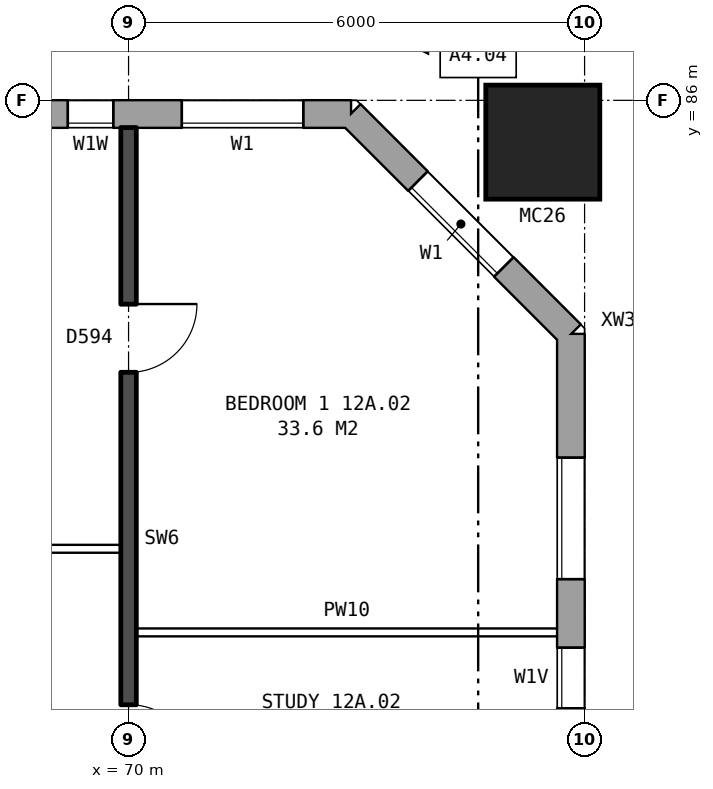
"""IFC4 building model, lengths in metres.
Left out: names, types, materials, properties, quantities, classifications, styles, units other than length and angle.
Written with IfcOpenShell. Run it as: python <this file> out.ifc"""

import sys

from ifc_helpers import new_model, si_unit, direction, frame, frame_2d, origin, origin_2d, place, context, subcontext, project, spatial, rectangle, hollow_rectangle, extrude, element, fill, save


model = new_model("IFC4")
c1 = context("Model", 3, precision=1e-05, world=origin(), true_north=direction((0.0, 1.0)))
c2 = subcontext(c1, "Body", "Model", "MODEL_VIEW")
j1 = project(units=[si_unit("LENGTHUNIT", "METRE"), si_unit("PLANEANGLEUNIT", "RADIAN")], contexts=[c1])
p1 = place(None, origin())
s1 = spatial("IfcSite", under=j1, at=p1, CompositionType="ELEMENT")
p2 = place(p1, origin())
s2 = spatial("IfcBuilding", under=s1, at=p2, CompositionType="ELEMENT")
p3 = place(p2, frame((0.0, 0.0, 47.4)))
s3 = spatial("IfcBuildingStorey", under=s2, at=p3, CompositionType="ELEMENT", Elevation=47.4)
p4 = place(p3, frame((75.45, 85.45, 0.0), z_axis=(0.0, 0.0, 1.0), x_axis=(1.0, 0.0, 0.0)))
e1 = element("IfcColumn", 1, at=p4, inside=s3, PredefinedType="COLUMN", context=c2, shape_type="SweptSolid", body=[
    extrude(hollow_rectangle(XDim=1.5, YDim=1.5, WallThickness=0.08, at=origin_2d()), origin(), (0.0, 0.0, 1.0), 3.1),
])
p5 = place(p3, frame((75.82, 57.075, 0.0), z_axis=(0.0, 0.0, 1.0), x_axis=(0.0, 1.0, 0.0)))
e2 = element("IfcWall", 2, at=p5, inside=s3, PredefinedType="STANDARD", context=c2, shape_type="SweptSolid", body=[
    extrude(rectangle(XDim=25.851, YDim=0.36, at=frame_2d((12.925, 0.0))), origin(), (0.0, 0.0, 1.0), 2.85),
])
p6 = place(p5, frame((1.625, 0.0, 0.8)))
e3 = element("IfcOpeningElement", 3, at=p6, cuts=e2, PredefinedType="OPENING", context=c2, shape_type="SweptSolid", body=[
    extrude(rectangle(XDim=1.6, YDim=1.8, at=frame_2d((0.8, 0.9))), frame((0.0, 0.19, 0.0), z_axis=(0.0, -1.0, 0.0), x_axis=(1.0, 0.0, 0.0)), (0.0, 0.0, 1.0), 0.38),
])
p7 = place(p5, frame((3.525, 0.0, 1.7)))
e4 = element("IfcOpeningElement", 4, at=p7, cuts=e2, PredefinedType="OPENING", context=c2, shape_type="SweptSolid", body=[
    extrude(rectangle(XDim=1.4, YDim=0.9, at=frame_2d((0.7, 0.45))), frame((0.0, 0.19, 0.0), z_axis=(0.0, -1.0, 0.0), x_axis=(1.0, 0.0, 0.0)), (0.0, 0.0, 1.0), 0.38),
])
p8 = place(p5, frame((19.225, 0.0, 0.45)))
e5 = element("IfcOpeningElement", 5, at=p8, cuts=e2, PredefinedType="OPENING", context=c2, shape_type="SweptSolid", body=[
    extrude(rectangle(XDim=1.0, YDim=0.9, at=frame_2d((0.5, 0.45))), frame((0.0, 0.19, 0.0), z_axis=(0.0, -1.0, 0.0), x_axis=(1.0, 0.0, 0.0)), (0.0, 0.0, 1.0), 0.38),
])
p9 = place(p5, frame((22.625, 0.0, 0.8)))
e6 = element("IfcOpeningElement", 6, at=p9, cuts=e2, PredefinedType="OPENING", context=c2, shape_type="SweptSolid", body=[
    extrude(rectangle(XDim=1.6, YDim=1.8, at=frame_2d((0.8, 0.9))), frame((0.0, 0.19, 0.0), z_axis=(0.0, -1.0, 0.0), x_axis=(1.0, 0.0, 0.0)), (0.0, 0.0, 1.0), 0.38),
])
p10 = place(p5, frame((20.925, 0.0, 1.65)))
e7 = element("IfcOpeningElement", 7, at=p10, cuts=e2, PredefinedType="OPENING", context=c2, shape_type="SweptSolid", body=[
    extrude(rectangle(XDim=0.8, YDim=0.9, at=frame_2d((0.4, 0.45))), frame((0.0, 0.19, 0.0), z_axis=(0.0, -1.0, 0.0), x_axis=(1.0, 0.0, 0.0)), (0.0, 0.0, 1.0), 0.38),
])
p11 = place(p3, frame((75.82, 82.925, 0.0), z_axis=(0.0, 0.0, 1.0), x_axis=(-0.707106781187, 0.707106781187, 0.0)))
e8 = element("IfcWall", 8, at=p11, inside=s3, PredefinedType="STANDARD", context=c2, shape_type="SweptSolid", body=[
    extrude(rectangle(XDim=4.094, YDim=0.36, at=frame_2d((2.047, 0.0))), origin(), (0.0, 0.0, 1.0), 2.85),
])
p12 = place(p11, frame((1.247, 0.0, 0.8)))
e9 = element("IfcOpeningElement", 9, at=p12, cuts=e8, PredefinedType="OPENING", context=c2, shape_type="SweptSolid", body=[
    extrude(rectangle(XDim=1.6, YDim=1.8, at=frame_2d((0.8, 0.9))), frame((0.0, 0.19, 0.0), z_axis=(0.0, -1.0, 0.0), x_axis=(1.0, 0.0, 0.0)), (0.0, 0.0, 1.0), 0.38),
])
p13 = place(p3, frame((72.925, 85.82, 0.0), z_axis=(0.0, 0.0, 1.0), x_axis=(-1.0, 0.0, 0.0)))
e10 = element("IfcWall", 10, at=p13, inside=s3, PredefinedType="STANDARD", context=c2, shape_type="SweptSolid", body=[
    extrude(rectangle(XDim=48.351, YDim=0.36, at=frame_2d((24.175, 0.0))), origin(), (0.0, 0.0, 1.0), 2.85),
])
p14 = place(p13, frame((0.625, 0.0, 0.8)))
e11 = element("IfcOpeningElement", 11, at=p14, cuts=e10, PredefinedType="OPENING", context=c2, shape_type="SweptSolid", body=[
    extrude(rectangle(XDim=1.6, YDim=1.8, at=frame_2d((0.8, 0.9))), frame((0.0, 0.19, 0.0), z_axis=(0.0, -1.0, 0.0), x_axis=(1.0, 0.0, 0.0)), (0.0, 0.0, 1.0), 0.38),
])
p15 = place(p13, frame((3.125, 0.0, 1.7)))
e12 = element("IfcOpeningElement", 12, at=p15, cuts=e10, PredefinedType="OPENING", context=c2, shape_type="SweptSolid", body=[
    extrude(rectangle(XDim=0.6, YDim=0.9, at=frame_2d((0.3, 0.45))), frame((0.0, 0.19, 0.0), z_axis=(0.0, -1.0, 0.0), x_axis=(1.0, 0.0, 0.0)), (0.0, 0.0, 1.0), 0.38),
])
p16 = place(p13, frame((6.625, 0.0, 0.8)))
e13 = element("IfcOpeningElement", 13, at=p16, cuts=e10, PredefinedType="OPENING", context=c2, shape_type="SweptSolid", body=[
    extrude(rectangle(XDim=1.6, YDim=1.8, at=frame_2d((0.8, 0.9))), frame((0.0, 0.19, 0.0), z_axis=(0.0, -1.0, 0.0), x_axis=(1.0, 0.0, 0.0)), (0.0, 0.0, 1.0), 0.38),
])
p17 = place(p13, frame((9.625, 0.0, 0.8)))
e14 = element("IfcOpeningElement", 14, at=p17, cuts=e10, PredefinedType="OPENING", context=c2, shape_type="SweptSolid", body=[
    extrude(rectangle(XDim=1.6, YDim=1.8, at=frame_2d((0.8, 0.9))), frame((0.0, 0.19, 0.0), z_axis=(0.0, -1.0, 0.0), x_axis=(1.0, 0.0, 0.0)), (0.0, 0.0, 1.0), 0.38),
])
p18 = place(p13, frame((12.625, 0.0, 0.8)))
e15 = element("IfcOpeningElement", 15, at=p18, cuts=e10, PredefinedType="OPENING", context=c2, shape_type="SweptSolid", body=[
    extrude(rectangle(XDim=1.6, YDim=1.8, at=frame_2d((0.8, 0.9))), frame((0.0, 0.19, 0.0), z_axis=(0.0, -1.0, 0.0), x_axis=(1.0, 0.0, 0.0)), (0.0, 0.0, 1.0), 0.38),
])
p19 = place(p13, frame((15.625, 0.0, 0.8)))
e16 = element("IfcOpeningElement", 16, at=p19, cuts=e10, PredefinedType="OPENING", context=c2, shape_type="SweptSolid", body=[
    extrude(rectangle(XDim=1.6, YDim=1.8, at=frame_2d((0.8, 0.9))), frame((0.0, 0.19, 0.0), z_axis=(0.0, -1.0, 0.0), x_axis=(1.0, 0.0, 0.0)), (0.0, 0.0, 1.0), 0.38),
])
p20 = place(p13, frame((18.625, 0.0, 0.8)))
e17 = element("IfcOpeningElement", 17, at=p20, cuts=e10, PredefinedType="OPENING", context=c2, shape_type="SweptSolid", body=[
    extrude(rectangle(XDim=1.6, YDim=1.8, at=frame_2d((0.8, 0.9))), frame((0.0, 0.19, 0.0), z_axis=(0.0, -1.0, 0.0), x_axis=(1.0, 0.0, 0.0)), (0.0, 0.0, 1.0), 0.38),
])
p21 = place(p13, frame((21.625, 0.0, 0.8)))
e18 = element("IfcOpeningElement", 18, at=p21, cuts=e10, PredefinedType="OPENING", context=c2, shape_type="SweptSolid", body=[
    extrude(rectangle(XDim=1.6, YDim=1.8, at=frame_2d((0.8, 0.9))), frame((0.0, 0.19, 0.0), z_axis=(0.0, -1.0, 0.0), x_axis=(1.0, 0.0, 0.0)), (0.0, 0.0, 1.0), 0.38),
])
p22 = place(p13, frame((24.625, 0.0, 0.8)))
e19 = element("IfcOpeningElement", 19, at=p22, cuts=e10, PredefinedType="OPENING", context=c2, shape_type="SweptSolid", body=[
    extrude(rectangle(XDim=1.6, YDim=1.8, at=frame_2d((0.8, 0.9))), frame((0.0, 0.19, 0.0), z_axis=(0.0, -1.0, 0.0), x_axis=(1.0, 0.0, 0.0)), (0.0, 0.0, 1.0), 0.38),
])
p23 = place(p13, frame((27.625, 0.0, 0.8)))
e20 = element("IfcOpeningElement", 20, at=p23, cuts=e10, PredefinedType="OPENING", context=c2, shape_type="SweptSolid", body=[
    extrude(rectangle(XDim=1.6, YDim=1.8, at=frame_2d((0.8, 0.9))), frame((0.0, 0.19, 0.0), z_axis=(0.0, -1.0, 0.0), x_axis=(1.0, 0.0, 0.0)), (0.0, 0.0, 1.0), 0.38),
])
p24 = place(p13, frame((30.625, 0.0, 0.8)))
e21 = element("IfcOpeningElement", 21, at=p24, cuts=e10, PredefinedType="OPENING", context=c2, shape_type="SweptSolid", body=[
    extrude(rectangle(XDim=1.6, YDim=1.8, at=frame_2d((0.8, 0.9))), frame((0.0, 0.19, 0.0), z_axis=(0.0, -1.0, 0.0), x_axis=(1.0, 0.0, 0.0)), (0.0, 0.0, 1.0), 0.38),
])
p25 = place(p13, frame((33.625, 0.0, 0.8)))
e22 = element("IfcOpeningElement", 22, at=p25, cuts=e10, PredefinedType="OPENING", context=c2, shape_type="SweptSolid", body=[
    extrude(rectangle(XDim=1.6, YDim=1.8, at=frame_2d((0.8, 0.9))), frame((0.0, 0.19, 0.0), z_axis=(0.0, -1.0, 0.0), x_axis=(1.0, 0.0, 0.0)), (0.0, 0.0, 1.0), 0.38),
])
p26 = place(p13, frame((36.625, 0.0, 0.8)))
e23 = element("IfcOpeningElement", 23, at=p26, cuts=e10, PredefinedType="OPENING", context=c2, shape_type="SweptSolid", body=[
    extrude(rectangle(XDim=1.6, YDim=1.8, at=frame_2d((0.8, 0.9))), frame((0.0, 0.19, 0.0), z_axis=(0.0, -1.0, 0.0), x_axis=(1.0, 0.0, 0.0)), (0.0, 0.0, 1.0), 0.38),
])
p27 = place(p13, frame((39.625, 0.0, 0.8)))
e24 = element("IfcOpeningElement", 24, at=p27, cuts=e10, PredefinedType="OPENING", context=c2, shape_type="SweptSolid", body=[
    extrude(rectangle(XDim=1.6, YDim=1.8, at=frame_2d((0.8, 0.9))), frame((0.0, 0.19, 0.0), z_axis=(0.0, -1.0, 0.0), x_axis=(1.0, 0.0, 0.0)), (0.0, 0.0, 1.0), 0.38),
])
p28 = place(p13, frame((41.525, 0.0, 0.8)))
e25 = element("IfcOpeningElement", 25, at=p28, cuts=e10, PredefinedType="OPENING", context=c2, shape_type="SweptSolid", body=[
    extrude(rectangle(XDim=1.2, YDim=1.2, at=frame_2d((0.6, 0.6))), frame((0.0, 0.19, 0.0), z_axis=(0.0, -1.0, 0.0), x_axis=(1.0, 0.0, 0.0)), (0.0, 0.0, 1.0), 0.38),
])
p29 = place(p13, frame((45.625, 0.0, 0.8)))
e26 = element("IfcOpeningElement", 26, at=p29, cuts=e10, PredefinedType="OPENING", context=c2, shape_type="SweptSolid", body=[
    extrude(rectangle(XDim=1.6, YDim=1.8, at=frame_2d((0.8, 0.9))), frame((0.0, 0.19, 0.0), z_axis=(0.0, -1.0, 0.0), x_axis=(1.0, 0.0, 0.0)), (0.0, 0.0, 1.0), 0.38),
])
p30 = place(p13, frame((5.225, 0.0, 0.8)))
e27 = element("IfcOpeningElement", 27, at=p30, cuts=e10, PredefinedType="OPENING", context=c2, shape_type="SweptSolid", body=[
    extrude(rectangle(XDim=1.0, YDim=0.9, at=frame_2d((0.5, 0.45))), frame((0.0, 0.19, 0.0), z_axis=(0.0, -1.0, 0.0), x_axis=(1.0, 0.0, 0.0)), (0.0, 0.0, 1.0), 0.38),
])
p31 = place(p3, frame((70.1, 79.0, 0.0), z_axis=(0.0, 0.0, 1.0), x_axis=(1.0, 0.0, 0.0)))
e28 = element("IfcWall", 28, at=p31, inside=s3, PredefinedType="PARTITIONING", context=c2, shape_type="SweptSolid", body=[
    extrude(rectangle(XDim=5.54, YDim=0.1, at=frame_2d((2.77, 0.0))), origin(), (0.0, 0.0, 1.0), 2.85),
])
p32 = place(p3, frame((64.1, 80.1, 0.0), z_axis=(0.0, 0.0, 1.0), x_axis=(1.0, 0.0, 0.0)))
e29 = element("IfcWall", 29, at=p32, inside=s3, PredefinedType="PARTITIONING", context=c2, shape_type="SweptSolid", body=[
    extrude(rectangle(XDim=5.8, YDim=0.1, at=frame_2d((2.9, 0.0))), origin(), (0.0, 0.0, 1.0), 2.85),
])
p33 = place(p32, frame((3.6, 0.0, 0.0)))
e30 = element("IfcOpeningElement", 30, at=p33, cuts=e29, PredefinedType="OPENING", context=c2, shape_type="SweptSolid", body=[
    extrude(rectangle(XDim=0.9, YDim=2.1, at=frame_2d((0.45, 1.05))), frame((0.0, 0.06, 0.0), z_axis=(0.0, -1.0, 0.0), x_axis=(1.0, 0.0, 0.0)), (0.0, 0.0, 1.0), 0.12),
])
p34 = place(p32, frame((0.7, 0.0, 0.0)))
e31 = element("IfcOpeningElement", 31, at=p34, cuts=e29, PredefinedType="OPENING", context=c2, shape_type="SweptSolid", body=[
    extrude(rectangle(XDim=0.9, YDim=2.1, at=frame_2d((0.45, 1.05))), frame((0.0, 0.06, 0.0), z_axis=(0.0, -1.0, 0.0), x_axis=(1.0, 0.0, 0.0)), (0.0, 0.0, 1.0), 0.12),
])
p35 = place(p3, frame((70.0, 76.2, 0.0), z_axis=(0.0, 0.0, 1.0), x_axis=(0.0, 1.0, 0.0)))
e32 = element("IfcWall", 32, at=p35, inside=s3, PredefinedType="SOLIDWALL", context=c2, shape_type="SweptSolid", body=[
    extrude(rectangle(XDim=9.44, YDim=0.2, at=frame_2d((4.72, 0.0))), origin(), (0.0, 0.0, 1.0), 2.85),
])
p36 = place(p35, frame((6.22, 0.0, 0.0)))
e33 = element("IfcOpeningElement", 33, at=p36, cuts=e32, PredefinedType="OPENING", context=c2, shape_type="SweptSolid", body=[
    extrude(rectangle(XDim=0.9, YDim=2.1, at=frame_2d((0.45, 1.05))), frame((0.0, 0.11, 0.0), z_axis=(0.0, -1.0, 0.0), x_axis=(1.0, 0.0, 0.0)), (0.0, 0.0, 1.0), 0.22),
])
p37 = place(p35, frame((0.95, 0.0, 0.0)))
e34 = element("IfcOpeningElement", 34, at=p37, cuts=e32, PredefinedType="OPENING", context=c2, shape_type="SweptSolid", body=[
    extrude(rectangle(XDim=0.9, YDim=2.1, at=frame_2d((0.45, 1.05))), frame((0.0, 0.11, 0.0), z_axis=(0.0, -1.0, 0.0), x_axis=(1.0, 0.0, 0.0)), (0.0, 0.0, 1.0), 0.22),
])
p38 = place(p9, origin())
e35 = element("IfcWindow", 35, at=p38, inside=s3, PartitioningType="SINGLE_PANEL", PredefinedType="WINDOW", context=c2, shape_type="SweptSolid", body=[
    extrude(rectangle(XDim=1.6, YDim=1.8, at=frame_2d((0.8, 0.9))), frame((0.0, 0.15, 0.0), z_axis=(0.0, -1.0, 0.0), x_axis=(1.0, 0.0, 0.0)), (0.0, 0.0, 1.0), 0.06),
])
fill(e6, e35)
p39 = place(p12, origin())
e36 = element("IfcWindow", 36, at=p39, inside=s3, PartitioningType="SINGLE_PANEL", PredefinedType="WINDOW", context=c2, shape_type="SweptSolid", body=[
    extrude(rectangle(XDim=1.6, YDim=1.8, at=frame_2d((0.8, 0.9))), frame((0.0, 0.15, 0.0), z_axis=(0.0, -1.0, 0.0), x_axis=(1.0, 0.0, 0.0)), (0.0, 0.0, 1.0), 0.06),
])
fill(e9, e36)
p40 = place(p14, origin())
e37 = element("IfcWindow", 37, at=p40, inside=s3, PartitioningType="SINGLE_PANEL", PredefinedType="WINDOW", context=c2, shape_type="SweptSolid", body=[
    extrude(rectangle(XDim=1.6, YDim=1.8, at=frame_2d((0.8, 0.9))), frame((0.0, 0.15, 0.0), z_axis=(0.0, -1.0, 0.0), x_axis=(1.0, 0.0, 0.0)), (0.0, 0.0, 1.0), 0.06),
])
fill(e11, e37)
p41 = place(p15, origin())
e38 = element("IfcWindow", 38, at=p41, inside=s3, PartitioningType="SINGLE_PANEL", PredefinedType="WINDOW", context=c2, shape_type="SweptSolid", body=[
    extrude(rectangle(XDim=0.6, YDim=0.9, at=frame_2d((0.3, 0.45))), frame((0.0, 0.15, 0.0), z_axis=(0.0, -1.0, 0.0), x_axis=(1.0, 0.0, 0.0)), (0.0, 0.0, 1.0), 0.06),
])
fill(e12, e38)
p42 = place(p36, frame((0.9, 0.0, 0.0), z_axis=(0.0, 0.0, 1.0), x_axis=(-1.0, 0.0, 0.0)))
e39 = element("IfcDoor", 39, at=p42, inside=s3, OperationType="SINGLE_SWING_LEFT", PredefinedType="DOOR", context=c2, shape_type="SweptSolid", body=[
    extrude(rectangle(XDim=0.9, YDim=2.1, at=frame_2d((0.45, 1.05))), frame((0.0, 0.025, 0.0), z_axis=(0.0, -1.0, 0.0), x_axis=(1.0, 0.0, 0.0)), (0.0, 0.0, 1.0), 0.05),
])
fill(e33, e39)
p43 = place(p37, frame((0.9, 0.0, 0.0), z_axis=(0.0, 0.0, 1.0), x_axis=(-1.0, 0.0, 0.0)))
e40 = element("IfcDoor", 40, at=p43, inside=s3, OperationType="SINGLE_SWING_RIGHT", PredefinedType="DOOR", context=c2, shape_type="SweptSolid", body=[
    extrude(rectangle(XDim=0.9, YDim=2.1, at=frame_2d((0.45, 1.05))), frame((0.0, 0.025, 0.0), z_axis=(0.0, -1.0, 0.0), x_axis=(1.0, 0.0, 0.0)), (0.0, 0.0, 1.0), 0.05),
])
fill(e34, e40)
p44 = place(p10, origin())
e41 = element("IfcWindow", 41, at=p44, inside=s3, PartitioningType="SINGLE_PANEL", PredefinedType="WINDOW", context=c2, shape_type="SweptSolid", body=[
    extrude(rectangle(XDim=0.8, YDim=0.9, at=frame_2d((0.4, 0.45))), frame((0.0, 0.15, 0.0), z_axis=(0.0, -1.0, 0.0), x_axis=(1.0, 0.0, 0.0)), (0.0, 0.0, 1.0), 0.06),
])
fill(e7, e41)
save(model, sys.argv[1])
